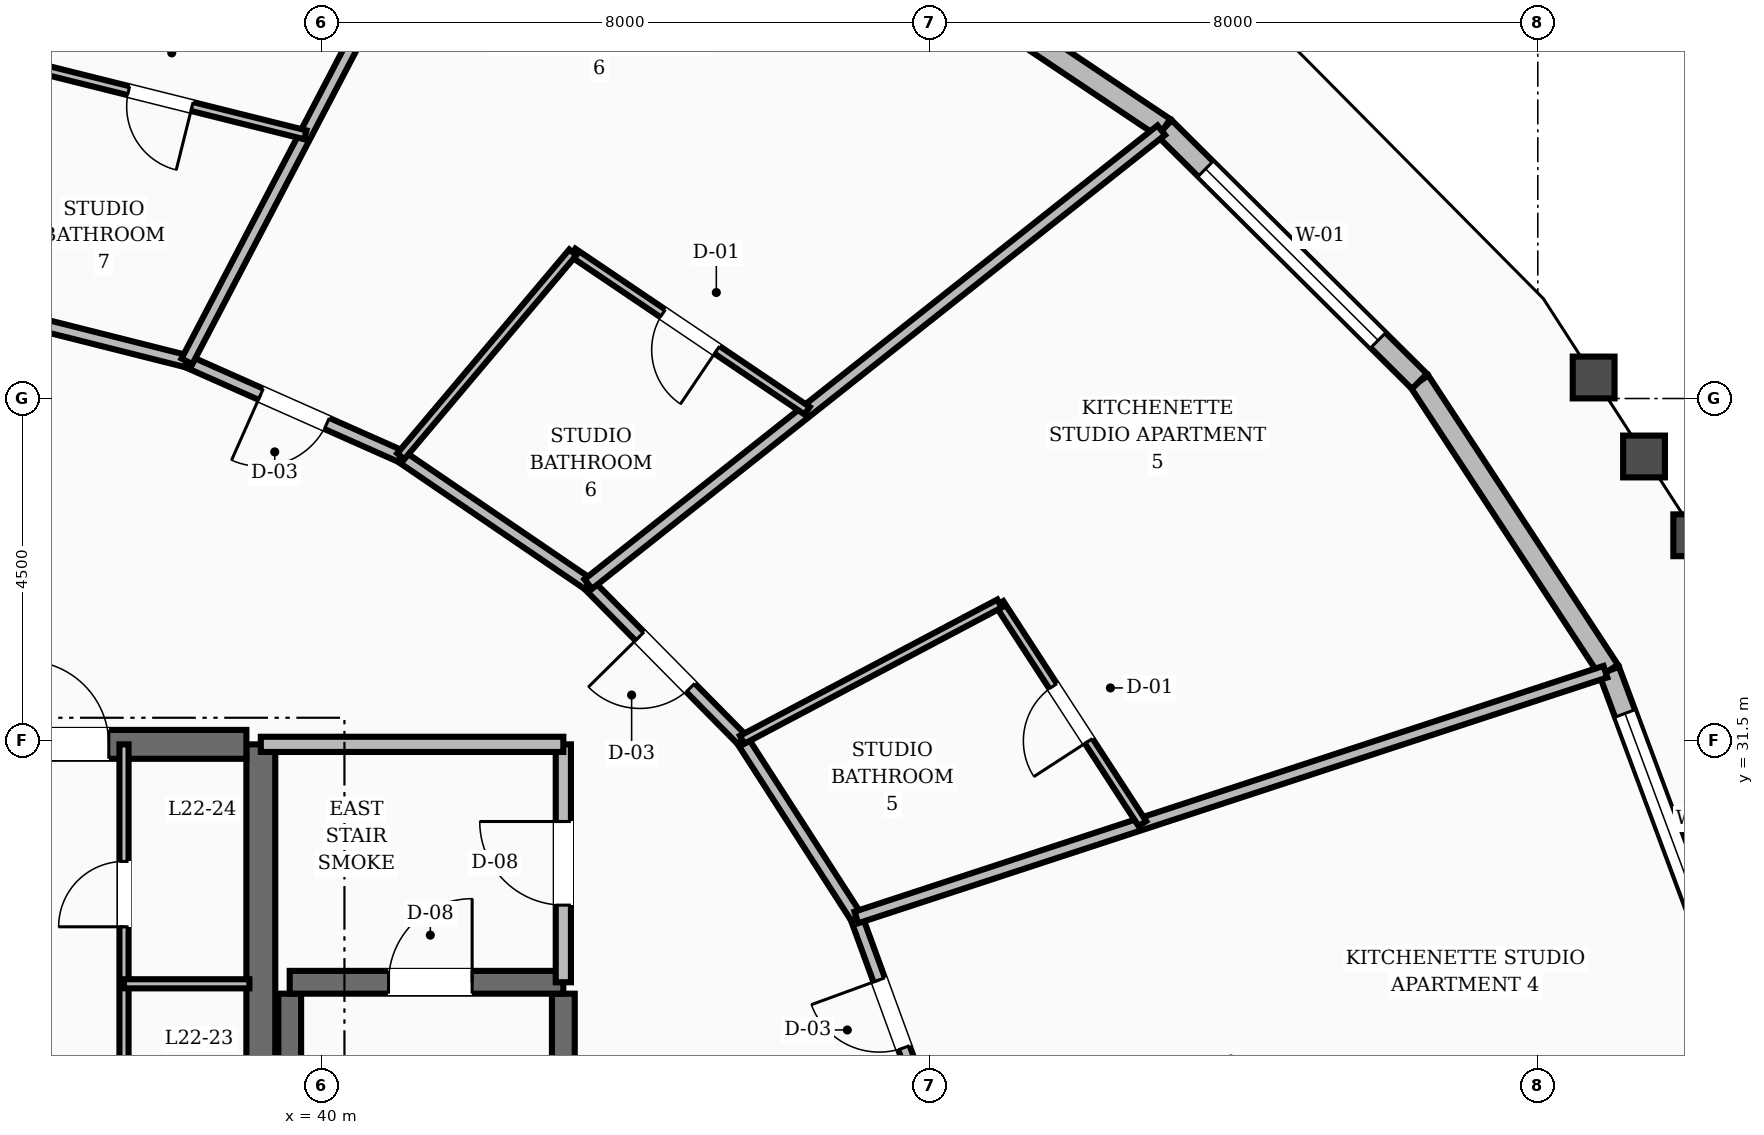
"""IFC4 building model, lengths in metres.
Left out: names, types, materials, properties, quantities, classifications, styles, units other than length and angle.
Written with IfcOpenShell. Run it as: python <this file> out.ifc"""

import sys

from ifc_helpers import new_model, si_unit, direction, frame, frame_2d, origin, place, context, subcontext, project, spatial, rectangle, extrude, element, fill, save


model = new_model("IFC4")
c1 = context("Model", 3, precision=1e-05, world=origin(), true_north=direction((0.0, 1.0)))
c2 = subcontext(c1, "Body", "Model", "MODEL_VIEW")
j1 = project(units=[si_unit("LENGTHUNIT", "METRE"), si_unit("PLANEANGLEUNIT", "RADIAN")], contexts=[c1])
p1 = place(None, origin())
s1 = spatial("IfcSite", under=j1, at=p1, CompositionType="ELEMENT")
p2 = place(p1, origin())
s2 = spatial("IfcBuilding", under=s1, at=p2, CompositionType="ELEMENT")
p3 = place(p2, frame((0.0, 0.0, 88.0)))
s3 = spatial("IfcBuildingStorey", under=s2, at=p3, CompositionType="ELEMENT", Elevation=88.0)
p4 = place(p3, frame((39.2, 25.15, 0.0), z_axis=(0.0, 0.0, 1.0), x_axis=(0.0, 1.0, 0.0)))
e1 = element("IfcWall", 1, at=p4, inside=s3, PredefinedType="SHEAR", context=c2, shape_type="SweptSolid", body=[
    extrude(rectangle(XDim=6.3, YDim=0.38, at=frame_2d((3.15, 0.0))), origin(), (0.0, 0.0, 1.0), 3.6),
])
p5 = place(p3, frame((35.8, 31.45, 0.0), z_axis=(0.0, 0.0, 1.0), x_axis=(1.0, 0.0, 0.0)))
e2 = element("IfcWall", 2, at=p5, inside=s3, PredefinedType="SHEAR", context=c2, shape_type="SweptSolid", body=[
    extrude(rectangle(XDim=3.21, YDim=0.38, at=frame_2d((1.605, 0.0))), origin(), (0.0, 0.0, 1.0), 3.6),
])
p6 = place(p5, frame((0.3, 0.0, 0.0)))
e3 = element("IfcOpeningElement", 3, at=p6, cuts=e2, PredefinedType="OPENING", context=c2, shape_type="SweptSolid", body=[
    extrude(rectangle(XDim=1.1, YDim=2.1, at=frame_2d((0.55, 1.05))), frame((0.0, 0.2, 0.0), z_axis=(0.0, -1.0, 0.0), x_axis=(1.0, 0.0, 0.0)), (0.0, 0.0, 1.0), 0.4),
])
for number, where, z_axis, x_axis in (
    (4, (43.18, 19.43, 0.0), (0.0, 0.0, 1.0), (0.0, 1.0, 0.0)),
    (5, (39.58, 19.43, 0.0), (0.0, 0.0, 1.0), (0.0, 1.0, 0.0)),
):
    element("IfcWall", number, at=place(p3, frame(where, z_axis=z_axis, x_axis=x_axis)), inside=s3, PredefinedType="SHEAR", context=c2, shape_type="SweptSolid", body=[
        extrude(rectangle(XDim=8.74, YDim=0.3, at=frame_2d((4.37, 0.0))), origin(), (0.0, 0.0, 1.0), 3.6),
    ])
p7 = place(p3, frame((39.58, 28.32, 0.0), z_axis=(0.0, 0.0, 1.0), x_axis=(1.0, 0.0, 0.0)))
e6 = element("IfcWall", 6, at=p7, inside=s3, PredefinedType="SHEAR", context=c2, shape_type="SweptSolid", body=[
    extrude(rectangle(XDim=3.6, YDim=0.3, at=frame_2d((1.8, 0.0))), origin(), (0.0, 0.0, 1.0), 3.6),
])
p8 = place(p7, frame((1.3, 0.0, 0.0)))
e7 = element("IfcOpeningElement", 7, at=p8, cuts=e6, PredefinedType="OPENING", context=c2, shape_type="SweptSolid", body=[
    extrude(rectangle(XDim=1.1, YDim=2.1, at=frame_2d((0.55, 1.05))), frame((0.0, 0.16, 0.0), z_axis=(0.0, -1.0, 0.0), x_axis=(1.0, 0.0, 0.0)), (0.0, 0.0, 1.0), 0.32),
])
p9 = place(p3, frame((58.473, 28.293, 0.0), z_axis=(0.0, 0.0, 1.0), x_axis=(-0.348747298865, 0.937216795376, 0.0)))
e8 = element("IfcWall", 8, at=p9, inside=s3, PredefinedType="STANDARD", context=c2, shape_type="SweptSolid", body=[
    extrude(rectangle(XDim=4.405, YDim=0.28, at=frame_2d((2.202, 0.0))), origin(), (0.0, 0.0, 1.0), 2.71),
])
p10 = place(p9, frame((0.602, 0.0, 0.8)))
e9 = element("IfcOpeningElement", 9, at=p10, cuts=e8, PredefinedType="OPENING", context=c2, shape_type="SweptSolid", body=[
    extrude(rectangle(XDim=3.2, YDim=1.65, at=frame_2d((1.6, 0.825))), frame((0.0, 0.15, 0.0), z_axis=(0.0, -1.0, 0.0), x_axis=(1.0, 0.0, 0.0)), (0.0, 0.0, 1.0), 0.3),
])
p11 = place(p3, frame((56.937, 32.421, 0.0), z_axis=(0.0, 0.0, 1.0), x_axis=(-0.548243756992, 0.836318589366, 0.0)))
e10 = element("IfcWall", 10, at=p11, inside=s3, PredefinedType="STANDARD", context=c2, shape_type="SweptSolid", body=[
    extrude(rectangle(XDim=4.549, YDim=0.28, at=frame_2d((2.275, 0.0))), origin(), (0.0, 0.0, 1.0), 2.71),
])
p12 = place(p3, frame((54.443, 36.226, 0.0), z_axis=(0.0, 0.0, 1.0), x_axis=(-0.709450520297, 0.704755247763, 0.0)))
e11 = element("IfcWall", 11, at=p12, inside=s3, PredefinedType="STANDARD", context=c2, shape_type="SweptSolid", body=[
    extrude(rectangle(XDim=4.732, YDim=0.28, at=frame_2d((2.366, 0.0))), origin(), (0.0, 0.0, 1.0), 2.71),
])
p13 = place(p12, frame((0.766, 0.0, 0.8)))
e12 = element("IfcOpeningElement", 12, at=p13, cuts=e11, PredefinedType="OPENING", context=c2, shape_type="SweptSolid", body=[
    extrude(rectangle(XDim=3.2, YDim=1.65, at=frame_2d((1.6, 0.825))), frame((0.0, 0.15, 0.0), z_axis=(0.0, -1.0, 0.0), x_axis=(1.0, 0.0, 0.0)), (0.0, 0.0, 1.0), 0.3),
])
p14 = place(p3, frame((51.086, 39.561, 0.0), z_axis=(0.0, 0.0, 1.0), x_axis=(-0.831102692713, 0.556118974829, 0.0)))
e13 = element("IfcWall", 13, at=p14, inside=s3, PredefinedType="STANDARD", context=c2, shape_type="SweptSolid", body=[
    extrude(rectangle(XDim=4.921, YDim=0.28, at=frame_2d((2.461, 0.0))), origin(), (0.0, 0.0, 1.0), 2.71),
])
p15 = place(p3, frame((43.18, 28.32, 0.0), z_axis=(0.0, 0.0, 1.0), x_axis=(0.0, 1.0, 0.0)))
e14 = element("IfcWall", 14, at=p15, inside=s3, PredefinedType="SOLIDWALL", context=c2, shape_type="SweptSolid", body=[
    extrude(rectangle(XDim=3.13, YDim=0.2, at=frame_2d((1.565, 0.0))), origin(), (0.0, 0.0, 1.0), 2.71),
])
p16 = place(p15, frame((1.015, 0.0, 0.0)))
e15 = element("IfcOpeningElement", 15, at=p16, cuts=e14, PredefinedType="OPENING", context=c2, shape_type="SweptSolid", body=[
    extrude(rectangle(XDim=1.1, YDim=2.1, at=frame_2d((0.55, 1.05))), frame((0.0, 0.11, 0.0), z_axis=(0.0, -1.0, 0.0), x_axis=(1.0, 0.0, 0.0)), (0.0, 0.0, 1.0), 0.22),
])
p17 = place(p3, frame((39.2, 31.45, 0.0), z_axis=(0.0, 0.0, 1.0), x_axis=(1.0, 0.0, 0.0)))
e16 = element("IfcWall", 16, at=p17, inside=s3, PredefinedType="SOLIDWALL", context=c2, shape_type="SweptSolid", body=[
    extrude(rectangle(XDim=3.98, YDim=0.2, at=frame_2d((1.99, 0.0))), origin(), (0.0, 0.0, 1.0), 2.71),
])
p18 = place(p3, frame((37.4, 25.25, 0.0), z_axis=(0.0, 0.0, 1.0), x_axis=(0.0, 1.0, 0.0)))
e17 = element("IfcWall", 17, at=p18, inside=s3, PredefinedType="PARTITIONING", context=c2, shape_type="SweptSolid", body=[
    extrude(rectangle(XDim=6.2, YDim=0.12, at=frame_2d((3.1, 0.0))), origin(), (0.0, 0.0, 1.0), 2.71),
])
p19 = place(p18, frame((0.8, 0.0, 0.0)))
e18 = element("IfcOpeningElement", 18, at=p19, cuts=e17, PredefinedType="OPENING", context=c2, shape_type="SweptSolid", body=[
    extrude(rectangle(XDim=0.86, YDim=2.1, at=frame_2d((0.43, 1.05))), frame((0.0, 0.07, 0.0), z_axis=(0.0, -1.0, 0.0), x_axis=(1.0, 0.0, 0.0)), (0.0, 0.0, 1.0), 0.14),
])
p20 = place(p18, frame((3.8, 0.0, 0.0)))
e19 = element("IfcOpeningElement", 19, at=p20, cuts=e17, PredefinedType="OPENING", context=c2, shape_type="SweptSolid", body=[
    extrude(rectangle(XDim=0.86, YDim=2.1, at=frame_2d((0.43, 1.05))), frame((0.0, 0.07, 0.0), z_axis=(0.0, -1.0, 0.0), x_axis=(1.0, 0.0, 0.0)), (0.0, 0.0, 1.0), 0.14),
])
p21 = place(p3, frame((37.4, 28.3, 0.0), z_axis=(0.0, 0.0, 1.0), x_axis=(1.0, 0.0, 0.0)))
e20 = element("IfcWall", 20, at=p21, inside=s3, PredefinedType="PARTITIONING", context=c2, shape_type="SweptSolid", body=[
    extrude(rectangle(XDim=1.65, YDim=0.12, at=frame_2d((0.825, 0.0))), origin(), (0.0, 0.0, 1.0), 2.71),
])
p22 = place(p3, frame((47.961, 26.637, 0.0), z_axis=(0.0, 0.0, 1.0), x_axis=(-0.343013437329, 0.939330496583, 0.0)))
e21 = element("IfcWall", 21, at=p22, inside=s3, PredefinedType="SOLIDWALL", context=c2, shape_type="SweptSolid", body=[
    extrude(rectangle(XDim=2.7, YDim=0.16, at=frame_2d((1.35, 0.0))), origin(), (0.0, 0.0, 1.0), 2.71),
])
p23 = place(p22, frame((0.875, 0.0, 0.0)))
e22 = element("IfcOpeningElement", 22, at=p23, cuts=e21, PredefinedType="OPENING", context=c2, shape_type="SweptSolid", body=[
    extrude(rectangle(XDim=0.95, YDim=2.1, at=frame_2d((0.475, 1.05))), frame((0.0, 0.09, 0.0), z_axis=(0.0, -1.0, 0.0), x_axis=(1.0, 0.0, 0.0)), (0.0, 0.0, 1.0), 0.18),
])
p24 = place(p3, frame((47.035, 29.173, 0.0), z_axis=(0.0, 0.0, 1.0), x_axis=(-0.541126045017, 0.840941498206, 0.0)))
e23 = element("IfcWall", 23, at=p24, inside=s3, PredefinedType="SOLIDWALL", context=c2, shape_type="SweptSolid", body=[
    extrude(rectangle(XDim=2.779, YDim=0.16, at=frame_2d((1.39, 0.0))), origin(), (0.0, 0.0, 1.0), 2.71),
])
p25 = place(p3, frame((45.531, 31.51, 0.0), z_axis=(0.0, 0.0, 1.0), x_axis=(-0.702811997, 0.711375636969, 0.0)))
e24 = element("IfcWall", 24, at=p25, inside=s3, PredefinedType="SOLIDWALL", context=c2, shape_type="SweptSolid", body=[
    extrude(rectangle(XDim=2.879, YDim=0.16, at=frame_2d((1.44, 0.0))), origin(), (0.0, 0.0, 1.0), 2.71),
])
p26 = place(p25, frame((0.965, 0.0, 0.0)))
e25 = element("IfcOpeningElement", 25, at=p26, cuts=e24, PredefinedType="OPENING", context=c2, shape_type="SweptSolid", body=[
    extrude(rectangle(XDim=0.95, YDim=2.1, at=frame_2d((0.475, 1.05))), frame((0.0, 0.09, 0.0), z_axis=(0.0, -1.0, 0.0), x_axis=(1.0, 0.0, 0.0)), (0.0, 0.0, 1.0), 0.18),
])
p27 = place(p3, frame((43.508, 33.559, 0.0), z_axis=(0.0, 0.0, 1.0), x_axis=(-0.826293096206, 0.56324037423, 0.0)))
e26 = element("IfcWall", 26, at=p27, inside=s3, PredefinedType="SOLIDWALL", context=c2, shape_type="SweptSolid", body=[
    extrude(rectangle(XDim=2.985, YDim=0.16, at=frame_2d((1.492, 0.0))), origin(), (0.0, 0.0, 1.0), 2.71),
])
p28 = place(p3, frame((41.041, 35.24, 0.0), z_axis=(0.0, 0.0, 1.0), x_axis=(-0.913952123493, 0.405822024984, 0.0)))
e27 = element("IfcWall", 27, at=p28, inside=s3, PredefinedType="SOLIDWALL", context=c2, shape_type="SweptSolid", body=[
    extrude(rectangle(XDim=3.078, YDim=0.16, at=frame_2d((1.539, 0.0))), origin(), (0.0, 0.0, 1.0), 2.71),
])
p29 = place(p28, frame((1.064, 0.0, 0.0)))
e28 = element("IfcOpeningElement", 28, at=p29, cuts=e27, PredefinedType="OPENING", context=c2, shape_type="SweptSolid", body=[
    extrude(rectangle(XDim=0.95, YDim=2.1, at=frame_2d((0.475, 1.05))), frame((0.0, 0.09, 0.0), z_axis=(0.0, -1.0, 0.0), x_axis=(1.0, 0.0, 0.0)), (0.0, 0.0, 1.0), 0.18),
])
p30 = place(p3, frame((38.228, 36.489, 0.0), z_axis=(0.0, 0.0, 1.0), x_axis=(-0.969689238064, 0.244341526521, 0.0)))
e29 = element("IfcWall", 29, at=p30, inside=s3, PredefinedType="SOLIDWALL", context=c2, shape_type="SweptSolid", body=[
    extrude(rectangle(XDim=3.148, YDim=0.16, at=frame_2d((1.574, 0.0))), origin(), (0.0, 0.0, 1.0), 2.71),
])
p31 = place(p3, frame((47.035, 29.173, 0.0), z_axis=(0.0, 0.0, 1.0), x_axis=(0.950181432226, 0.311697362603, 0.0)))
e30 = element("IfcWall", 30, at=p31, inside=s3, PredefinedType="SOLIDWALL", context=c2, shape_type="SweptSolid", body=[
    extrude(rectangle(XDim=10.371, YDim=0.16, at=frame_2d((5.186, 0.0))), origin(), (0.0, 0.0, 1.0), 2.71),
])
p32 = place(p3, frame((50.798, 30.407, 0.0), z_axis=(0.0, 0.0, 1.0), x_axis=(-0.544687497821, 0.83863909384, 0.0)))
e31 = element("IfcWall", 31, at=p32, inside=s3, PredefinedType="PARTITIONING", context=c2, shape_type="SweptSolid", body=[
    extrude(rectangle(XDim=3.452, YDim=0.12, at=frame_2d((1.726, 0.0))), origin(), (0.0, 0.0, 1.0), 2.71),
])
p33 = place(p32, frame((1.296, 0.0, 0.0)))
e32 = element("IfcOpeningElement", 32, at=p33, cuts=e31, PredefinedType="OPENING", context=c2, shape_type="SweptSolid", body=[
    extrude(rectangle(XDim=0.86, YDim=2.1, at=frame_2d((0.43, 1.05))), frame((0.0, 0.07, 0.0), z_axis=(0.0, -1.0, 0.0), x_axis=(1.0, 0.0, 0.0)), (0.0, 0.0, 1.0), 0.14),
])
p34 = place(p3, frame((45.531, 31.51, 0.0), z_axis=(0.0, 0.0, 1.0), x_axis=(0.883879348267, 0.46771497486, 0.0)))
e33 = element("IfcWall", 33, at=p34, inside=s3, PredefinedType="PARTITIONING", context=c2, shape_type="SweptSolid", body=[
    extrude(rectangle(XDim=3.831, YDim=0.12, at=frame_2d((1.916, 0.0))), origin(), (0.0, 0.0, 1.0), 2.71),
])
p35 = place(p3, frame((43.508, 33.559, 0.0), z_axis=(0.0, 0.0, 1.0), x_axis=(0.783915576776, 0.620867432298, 0.0)))
e34 = element("IfcWall", 34, at=p35, inside=s3, PredefinedType="SOLIDWALL", context=c2, shape_type="SweptSolid", body=[
    extrude(rectangle(XDim=9.617, YDim=0.16, at=frame_2d((4.809, 0.0))), origin(), (0.0, 0.0, 1.0), 2.71),
])
p36 = place(p3, frame((46.387, 35.84, 0.0), z_axis=(0.0, 0.0, 1.0), x_axis=(-0.828744435989, 0.559627250781, 0.0)))
e35 = element("IfcWall", 35, at=p36, inside=s3, PredefinedType="PARTITIONING", context=c2, shape_type="SweptSolid", body=[
    extrude(rectangle(XDim=3.72, YDim=0.12, at=frame_2d((1.86, 0.0))), origin(), (0.0, 0.0, 1.0), 2.71),
])
p37 = place(p36, frame((1.43, 0.0, 0.0)))
e36 = element("IfcOpeningElement", 36, at=p37, cuts=e35, PredefinedType="OPENING", context=c2, shape_type="SweptSolid", body=[
    extrude(rectangle(XDim=0.86, YDim=2.1, at=frame_2d((0.43, 1.05))), frame((0.0, 0.07, 0.0), z_axis=(0.0, -1.0, 0.0), x_axis=(1.0, 0.0, 0.0)), (0.0, 0.0, 1.0), 0.14),
])
p38 = place(p3, frame((41.041, 35.24, 0.0), z_axis=(0.0, 0.0, 1.0), x_axis=(0.644846806951, 0.764311844449, 0.0)))
e37 = element("IfcWall", 37, at=p38, inside=s3, PredefinedType="PARTITIONING", context=c2, shape_type="SweptSolid", body=[
    extrude(rectangle(XDim=3.509, YDim=0.12, at=frame_2d((1.754, 0.0))), origin(), (0.0, 0.0, 1.0), 2.71),
])
p39 = place(p3, frame((38.228, 36.489, 0.0), z_axis=(0.0, 0.0, 1.0), x_axis=(0.463452284004, 0.886121876748, 0.0)))
e38 = element("IfcWall", 38, at=p39, inside=s3, PredefinedType="SOLIDWALL", context=c2, shape_type="SweptSolid", body=[
    extrude(rectangle(XDim=8.8, YDim=0.16, at=frame_2d((4.4, 0.0))), origin(), (0.0, 0.0, 1.0), 2.71),
])
p40 = place(p3, frame((39.786, 39.469, 0.0), z_axis=(0.0, 0.0, 1.0), x_axis=(-0.970222757972, 0.242214367684, 0.0)))
e39 = element("IfcWall", 39, at=p40, inside=s3, PredefinedType="PARTITIONING", context=c2, shape_type="SweptSolid", body=[
    extrude(rectangle(XDim=3.934, YDim=0.12, at=frame_2d((1.967, 0.0))), origin(), (0.0, 0.0, 1.0), 2.71),
])
p41 = place(p40, frame((1.537, 0.0, 0.0)))
e40 = element("IfcOpeningElement", 40, at=p41, cuts=e39, PredefinedType="OPENING", context=c2, shape_type="SweptSolid", body=[
    extrude(rectangle(XDim=0.86, YDim=2.1, at=frame_2d((0.43, 1.05))), frame((0.0, 0.07, 0.0), z_axis=(0.0, -1.0, 0.0), x_axis=(1.0, 0.0, 0.0)), (0.0, 0.0, 1.0), 0.14),
])
p42 = place(p10, origin())
e41 = element("IfcWindow", 41, at=p42, inside=s3, PartitioningType="SINGLE_PANEL", PredefinedType="WINDOW", context=c2, shape_type="SweptSolid", body=[
    extrude(rectangle(XDim=3.2, YDim=1.65, at=frame_2d((1.6, 0.825))), frame((0.0, 0.03, 0.0), z_axis=(0.0, -1.0, 0.0), x_axis=(1.0, 0.0, 0.0)), (0.0, 0.0, 1.0), 0.06),
])
fill(e9, e41)
p43 = place(p13, origin())
e42 = element("IfcWindow", 42, at=p43, inside=s3, PartitioningType="SINGLE_PANEL", PredefinedType="WINDOW", context=c2, shape_type="SweptSolid", body=[
    extrude(rectangle(XDim=3.2, YDim=1.65, at=frame_2d((1.6, 0.825))), frame((0.0, 0.03, 0.0), z_axis=(0.0, -1.0, 0.0), x_axis=(1.0, 0.0, 0.0)), (0.0, 0.0, 1.0), 0.06),
])
fill(e12, e42)
p44 = place(p8, origin())
e43 = element("IfcDoor", 43, at=p44, inside=s3, OperationType="SINGLE_SWING_RIGHT", PredefinedType="DOOR", context=c2, shape_type="SweptSolid", body=[
    extrude(rectangle(XDim=1.1, YDim=2.1, at=frame_2d((0.55, 1.05))), frame((0.0, 0.025, 0.0), z_axis=(0.0, -1.0, 0.0), x_axis=(1.0, 0.0, 0.0)), (0.0, 0.0, 1.0), 0.05),
])
fill(e7, e43)
p45 = place(p16, origin())
e44 = element("IfcDoor", 44, at=p45, inside=s3, OperationType="SINGLE_SWING_RIGHT", PredefinedType="DOOR", context=c2, shape_type="SweptSolid", body=[
    extrude(rectangle(XDim=1.1, YDim=2.1, at=frame_2d((0.55, 1.05))), frame((0.0, 0.025, 0.0), z_axis=(0.0, -1.0, 0.0), x_axis=(1.0, 0.0, 0.0)), (0.0, 0.0, 1.0), 0.05),
])
fill(e15, e44)
p46 = place(p6, origin())
e45 = element("IfcDoor", 45, at=p46, inside=s3, OperationType="SINGLE_SWING_LEFT", PredefinedType="DOOR", context=c2, shape_type="SweptSolid", body=[
    extrude(rectangle(XDim=1.1, YDim=2.1, at=frame_2d((0.55, 1.05))), frame((0.0, 0.025, 0.0), z_axis=(0.0, -1.0, 0.0), x_axis=(1.0, 0.0, 0.0)), (0.0, 0.0, 1.0), 0.05),
])
fill(e3, e45)
p47 = place(p20, origin())
e46 = element("IfcDoor", 46, at=p47, inside=s3, OperationType="SINGLE_SWING_LEFT", PredefinedType="DOOR", context=c2, shape_type="SweptSolid", body=[
    extrude(rectangle(XDim=0.86, YDim=2.1, at=frame_2d((0.43, 1.05))), frame((0.0, 0.025, 0.0), z_axis=(0.0, -1.0, 0.0), x_axis=(1.0, 0.0, 0.0)), (0.0, 0.0, 1.0), 0.05),
])
fill(e19, e46)
p48 = place(p23, origin())
e47 = element("IfcDoor", 47, at=p48, inside=s3, OperationType="SINGLE_SWING_RIGHT", PredefinedType="DOOR", context=c2, shape_type="SweptSolid", body=[
    extrude(rectangle(XDim=0.95, YDim=2.1, at=frame_2d((0.475, 1.05))), frame((0.0, 0.025, 0.0), z_axis=(0.0, -1.0, 0.0), x_axis=(1.0, 0.0, 0.0)), (0.0, 0.0, 1.0), 0.05),
])
fill(e22, e47)
p49 = place(p33, origin())
e48 = element("IfcDoor", 48, at=p49, inside=s3, OperationType="SINGLE_SWING_LEFT", PredefinedType="DOOR", context=c2, shape_type="SweptSolid", body=[
    extrude(rectangle(XDim=0.86, YDim=2.1, at=frame_2d((0.43, 1.05))), frame((0.0, 0.025, 0.0), z_axis=(0.0, -1.0, 0.0), x_axis=(1.0, 0.0, 0.0)), (0.0, 0.0, 1.0), 0.05),
])
fill(e32, e48)
p50 = place(p26, origin())
e49 = element("IfcDoor", 49, at=p50, inside=s3, OperationType="SINGLE_SWING_RIGHT", PredefinedType="DOOR", context=c2, shape_type="SweptSolid", body=[
    extrude(rectangle(XDim=0.95, YDim=2.1, at=frame_2d((0.475, 1.05))), frame((0.0, 0.025, 0.0), z_axis=(0.0, -1.0, 0.0), x_axis=(1.0, 0.0, 0.0)), (0.0, 0.0, 1.0), 0.05),
])
fill(e25, e49)
p51 = place(p37, origin())
e50 = element("IfcDoor", 50, at=p51, inside=s3, OperationType="SINGLE_SWING_LEFT", PredefinedType="DOOR", context=c2, shape_type="SweptSolid", body=[
    extrude(rectangle(XDim=0.86, YDim=2.1, at=frame_2d((0.43, 1.05))), frame((0.0, 0.025, 0.0), z_axis=(0.0, -1.0, 0.0), x_axis=(1.0, 0.0, 0.0)), (0.0, 0.0, 1.0), 0.05),
])
fill(e36, e50)
p52 = place(p29, origin())
e51 = element("IfcDoor", 51, at=p52, inside=s3, OperationType="SINGLE_SWING_RIGHT", PredefinedType="DOOR", context=c2, shape_type="SweptSolid", body=[
    extrude(rectangle(XDim=0.95, YDim=2.1, at=frame_2d((0.475, 1.05))), frame((0.0, 0.025, 0.0), z_axis=(0.0, -1.0, 0.0), x_axis=(1.0, 0.0, 0.0)), (0.0, 0.0, 1.0), 0.05),
])
fill(e28, e51)
p53 = place(p41, origin())
e52 = element("IfcDoor", 52, at=p53, inside=s3, OperationType="SINGLE_SWING_LEFT", PredefinedType="DOOR", context=c2, shape_type="SweptSolid", body=[
    extrude(rectangle(XDim=0.86, YDim=2.1, at=frame_2d((0.43, 1.05))), frame((0.0, 0.025, 0.0), z_axis=(0.0, -1.0, 0.0), x_axis=(1.0, 0.0, 0.0)), (0.0, 0.0, 1.0), 0.05),
])
fill(e40, e52)
save(model, sys.argv[1])
